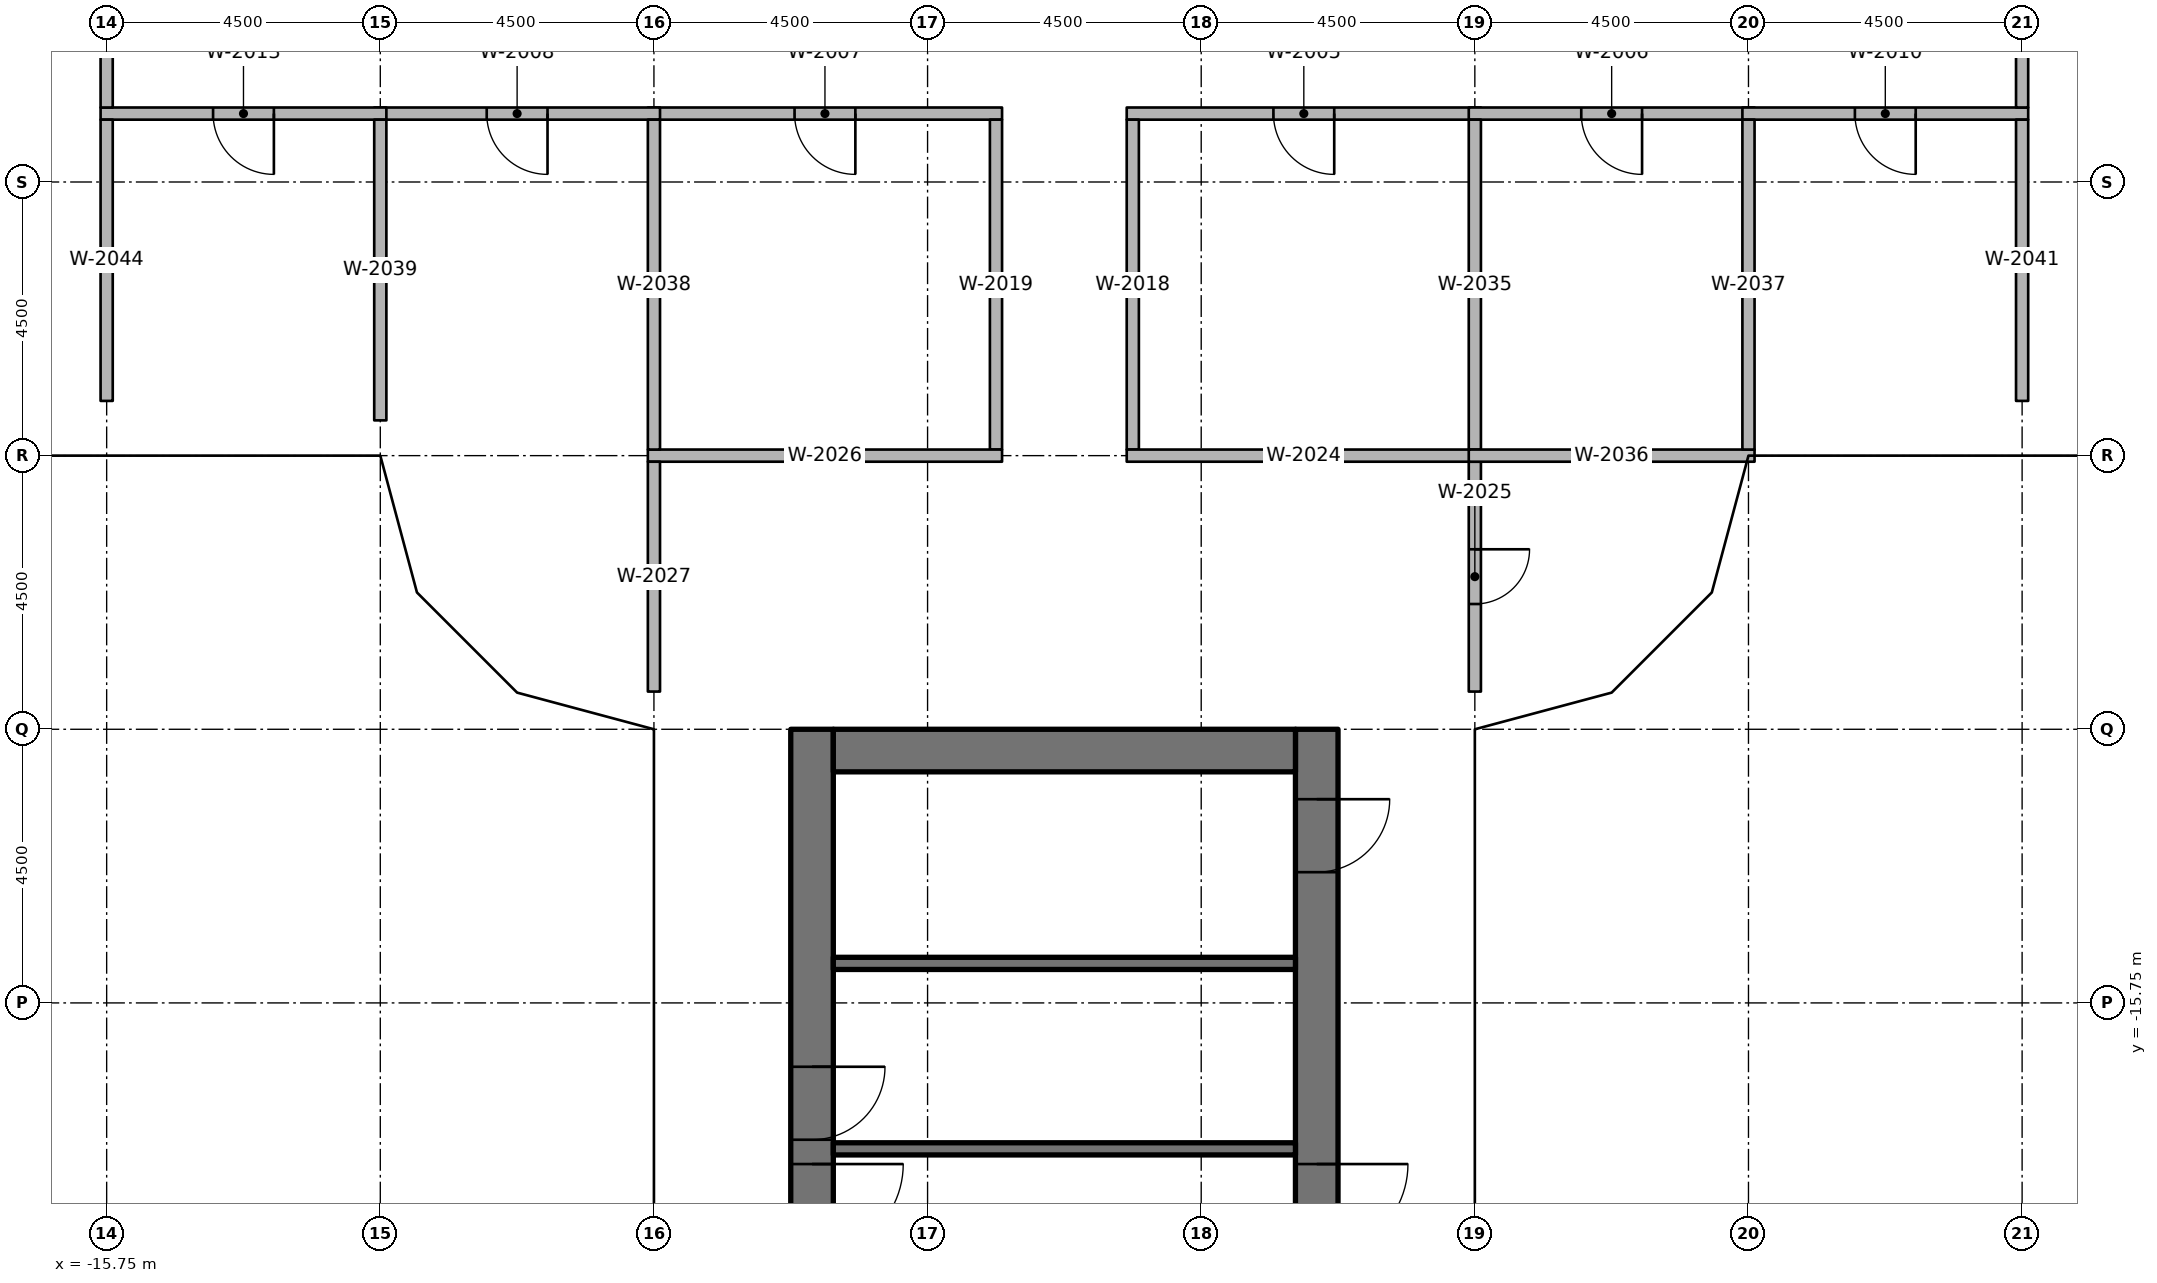
"""IFC4 building model, lengths in metres.
Left out: names, types, materials, properties, quantities, classifications, styles, units other than length and angle.
Written with IfcOpenShell. Run it as: python <this file> out.ifc"""

import sys

from ifc_helpers import new_model, si_unit, direction, frame, frame_2d, origin, origin_2d, place, context, subcontext, project, spatial, rectangle, extrude, element, fill, save


model = new_model("IFC4")
c1 = context("Model", 3, precision=1e-05, world=origin(), true_north=direction((0.0, 1.0)))
c2 = subcontext(c1, "Body", "Model", "MODEL_VIEW")
j1 = project(units=[si_unit("LENGTHUNIT", "METRE"), si_unit("PLANEANGLEUNIT", "RADIAN")], contexts=[c1])
p1 = place(None, origin())
s1 = spatial("IfcSite", under=j1, at=p1, CompositionType="ELEMENT")
p2 = place(p1, origin())
s2 = spatial("IfcBuilding", under=s1, at=p2, CompositionType="ELEMENT")
p3 = place(p2, frame((0.0, 0.0, 186.6)))
s3 = spatial("IfcBuildingStorey", under=s2, at=p3, CompositionType="ELEMENT", Elevation=186.6)
for number, where, z_axis, x_axis in (
    (1, (-15.75, -6.25, 0.0), (0.0, 0.0, 1.0), (1.0, 0.0, 0.0)),
    (2, (-10.75, -6.25, 0.0), (0.0, 0.0, 1.0), (1.0, 0.0, 0.0)),
    (3, (-6.25, -15.75, 0.0), (0.0, 0.0, 1.0), (1.0, 0.0, 0.0)),
    (4, (-6.25, -10.75, 0.0), (0.0, 0.0, 1.0), (1.0, 0.0, 0.0)),
    (5, (-6.25, -6.25, 0.0), (0.0, 0.0, 1.0), (1.0, 0.0, 0.0)),
    (6, (6.25, -15.75, 0.0), (0.0, 0.0, 1.0), (1.0, 0.0, 0.0)),
    (7, (6.25, -10.75, 0.0), (0.0, 0.0, 1.0), (1.0, 0.0, 0.0)),
    (8, (6.25, -6.25, 0.0), (0.0, 0.0, 1.0), (1.0, 0.0, 0.0)),
    (9, (10.75, -6.25, 0.0), (0.0, 0.0, 1.0), (1.0, 0.0, 0.0)),
    (10, (15.75, -6.25, 0.0), (0.0, 0.0, 1.0), (1.0, 0.0, 0.0)),
):
    element("IfcColumn", number, at=place(p3, frame(where, z_axis=z_axis, x_axis=x_axis)), inside=s3, PredefinedType="COLUMN", context=c2, shape_type="SweptSolid", body=[
        extrude(rectangle(XDim=0.8, YDim=0.8, at=origin_2d()), origin(), (0.0, 0.0, 1.0), 3.65),
    ])
p4 = place(p3, frame((-4.15, -11.25, 0.0), z_axis=(0.0, 0.0, 1.0), x_axis=(0.0, -1.0, 0.0)))
e11 = element("IfcWall", 11, at=p4, inside=s3, PredefinedType="SHEAR", context=c2, shape_type="SweptSolid", body=[
    extrude(rectangle(XDim=15.0, YDim=0.7, at=frame_2d((7.5, 0.0))), origin(), (0.0, 0.0, 1.0), 3.8),
])
p5 = place(p4, frame((7.15, 0.0, 0.0)))
e12 = element("IfcOpeningElement", 12, at=p5, cuts=e11, PredefinedType="OPENING", context=c2, shape_type="SweptSolid", body=[
    extrude(rectangle(XDim=1.5, YDim=2.3, at=frame_2d((0.75, 1.15))), frame((0.0, 0.36, 0.0), z_axis=(0.0, -1.0, 0.0), x_axis=(1.0, 0.0, 0.0)), (0.0, 0.0, 1.0), 0.72),
])
p6 = place(p4, frame((5.55, 0.0, 0.0)))
e13 = element("IfcOpeningElement", 13, at=p6, cuts=e11, PredefinedType="OPENING", context=c2, shape_type="SweptSolid", body=[
    extrude(rectangle(XDim=1.2, YDim=2.1, at=frame_2d((0.6, 1.05))), frame((0.0, 0.36, 0.0), z_axis=(0.0, -1.0, 0.0), x_axis=(1.0, 0.0, 0.0)), (0.0, 0.0, 1.0), 0.72),
])
p7 = place(p3, frame((4.15, -11.25, 0.0), z_axis=(0.0, 0.0, 1.0), x_axis=(0.0, -1.0, 0.0)))
e14 = element("IfcWall", 14, at=p7, inside=s3, PredefinedType="SHEAR", context=c2, shape_type="SweptSolid", body=[
    extrude(rectangle(XDim=15.0, YDim=0.7, at=frame_2d((7.5, 0.0))), origin(), (0.0, 0.0, 1.0), 3.8),
])
p8 = place(p7, frame((7.15, 0.0, 0.0)))
e15 = element("IfcOpeningElement", 15, at=p8, cuts=e14, PredefinedType="OPENING", context=c2, shape_type="SweptSolid", body=[
    extrude(rectangle(XDim=1.5, YDim=2.3, at=frame_2d((0.75, 1.15))), frame((0.0, 0.36, 0.0), z_axis=(0.0, -1.0, 0.0), x_axis=(1.0, 0.0, 0.0)), (0.0, 0.0, 1.0), 0.72),
])
p9 = place(p7, frame((13.9, 0.0, 0.0)))
e16 = element("IfcOpeningElement", 16, at=p9, cuts=e14, PredefinedType="OPENING", context=c2, shape_type="SweptSolid", body=[
    extrude(rectangle(XDim=0.9, YDim=2.1, at=frame_2d((0.45, 1.05))), frame((0.0, 0.36, 0.0), z_axis=(0.0, -1.0, 0.0), x_axis=(1.0, 0.0, 0.0)), (0.0, 0.0, 1.0), 0.72),
])
p10 = place(p7, frame((1.15, 0.0, 0.0)))
e17 = element("IfcOpeningElement", 17, at=p10, cuts=e14, PredefinedType="OPENING", context=c2, shape_type="SweptSolid", body=[
    extrude(rectangle(XDim=1.2, YDim=2.1, at=frame_2d((0.6, 1.05))), frame((0.0, 0.36, 0.0), z_axis=(0.0, -1.0, 0.0), x_axis=(1.0, 0.0, 0.0)), (0.0, 0.0, 1.0), 0.72),
])
p11 = place(p3, frame((-3.8, -11.6, 0.0), z_axis=(0.0, 0.0, 1.0), x_axis=(1.0, 0.0, 0.0)))
e18 = element("IfcWall", 18, at=p11, inside=s3, PredefinedType="SHEAR", context=c2, shape_type="SweptSolid", body=[
    extrude(rectangle(XDim=7.6, YDim=0.7, at=frame_2d((3.8, 0.0))), origin(), (0.0, 0.0, 1.0), 3.8),
])
for number, where, z_axis, x_axis in (
    (19, (3.8, -18.15, 0.0), (0.0, 0.0, 1.0), (-1.0, 0.0, 0.0)),
    (20, (3.8, -15.1, 0.0), (0.0, 0.0, 1.0), (-1.0, 0.0, 0.0)),
):
    element("IfcWall", number, at=place(p3, frame(where, z_axis=z_axis, x_axis=x_axis)), inside=s3, PredefinedType="SHEAR", context=c2, shape_type="SweptSolid", body=[
        extrude(rectangle(XDim=7.6, YDim=0.2, at=frame_2d((3.8, 0.0))), origin(), (0.0, 0.0, 1.0), 3.65),
    ])
p12 = place(p3, frame((6.85, -1.125, 0.0), z_axis=(0.0, 0.0, 1.0), x_axis=(-1.0, 0.0, 0.0)))
e21 = element("IfcWall", 21, at=p12, inside=s3, PredefinedType="PARTITIONING", context=c2, shape_type="SweptSolid", body=[
    extrude(rectangle(XDim=5.825, YDim=0.2, at=frame_2d((2.913, 0.0))), origin(), (0.0, 0.0, 1.0), 2.746),
])
p13 = place(p12, frame((2.413, 0.0, 0.0)))
e22 = element("IfcOpeningElement", 22, at=p13, cuts=e21, PredefinedType="OPENING", context=c2, shape_type="SweptSolid", body=[
    extrude(rectangle(XDim=1.0, YDim=2.1, at=frame_2d((0.5, 1.05))), frame((0.0, 0.11, 0.0), z_axis=(0.0, -1.0, 0.0), x_axis=(1.0, 0.0, 0.0)), (0.0, 0.0, 1.0), 0.22),
])
p14 = place(p3, frame((11.35, -1.125, 0.0), z_axis=(0.0, 0.0, 1.0), x_axis=(-1.0, 0.0, 0.0)))
e23 = element("IfcWall", 23, at=p14, inside=s3, PredefinedType="PARTITIONING", context=c2, shape_type="SweptSolid", body=[
    extrude(rectangle(XDim=4.7, YDim=0.2, at=frame_2d((2.35, 0.0))), origin(), (0.0, 0.0, 1.0), 2.746),
])
p15 = place(p14, frame((1.85, 0.0, 0.0)))
e24 = element("IfcOpeningElement", 24, at=p15, cuts=e23, PredefinedType="OPENING", context=c2, shape_type="SweptSolid", body=[
    extrude(rectangle(XDim=1.0, YDim=2.1, at=frame_2d((0.5, 1.05))), frame((0.0, 0.11, 0.0), z_axis=(0.0, -1.0, 0.0), x_axis=(1.0, 0.0, 0.0)), (0.0, 0.0, 1.0), 0.22),
])
p16 = place(p3, frame((-1.025, -1.125, 0.0), z_axis=(0.0, 0.0, 1.0), x_axis=(-1.0, 0.0, 0.0)))
e25 = element("IfcWall", 25, at=p16, inside=s3, PredefinedType="PARTITIONING", context=c2, shape_type="SweptSolid", body=[
    extrude(rectangle(XDim=5.825, YDim=0.2, at=frame_2d((2.913, 0.0))), origin(), (0.0, 0.0, 1.0), 2.746),
])
p17 = place(p16, frame((2.413, 0.0, 0.0)))
e26 = element("IfcOpeningElement", 26, at=p17, cuts=e25, PredefinedType="OPENING", context=c2, shape_type="SweptSolid", body=[
    extrude(rectangle(XDim=1.0, YDim=2.1, at=frame_2d((0.5, 1.05))), frame((0.0, 0.11, 0.0), z_axis=(0.0, -1.0, 0.0), x_axis=(1.0, 0.0, 0.0)), (0.0, 0.0, 1.0), 0.22),
])
p18 = place(p3, frame((-6.65, -1.125, 0.0), z_axis=(0.0, 0.0, 1.0), x_axis=(-1.0, 0.0, 0.0)))
e27 = element("IfcWall", 27, at=p18, inside=s3, PredefinedType="PARTITIONING", context=c2, shape_type="SweptSolid", body=[
    extrude(rectangle(XDim=4.7, YDim=0.2, at=frame_2d((2.35, 0.0))), origin(), (0.0, 0.0, 1.0), 2.746),
])
p19 = place(p18, frame((1.85, 0.0, 0.0)))
e28 = element("IfcOpeningElement", 28, at=p19, cuts=e27, PredefinedType="OPENING", context=c2, shape_type="SweptSolid", body=[
    extrude(rectangle(XDim=1.0, YDim=2.1, at=frame_2d((0.5, 1.05))), frame((0.0, 0.11, 0.0), z_axis=(0.0, -1.0, 0.0), x_axis=(1.0, 0.0, 0.0)), (0.0, 0.0, 1.0), 0.22),
])
p20 = place(p3, frame((15.85, -1.125, 0.0), z_axis=(0.0, 0.0, 1.0), x_axis=(-1.0, 0.0, 0.0)))
e29 = element("IfcWall", 29, at=p20, inside=s3, PredefinedType="PARTITIONING", context=c2, shape_type="SweptSolid", body=[
    extrude(rectangle(XDim=4.7, YDim=0.2, at=frame_2d((2.35, 0.0))), origin(), (0.0, 0.0, 1.0), 2.746),
])
p21 = place(p20, frame((1.85, 0.0, 0.0)))
e30 = element("IfcOpeningElement", 30, at=p21, cuts=e29, PredefinedType="OPENING", context=c2, shape_type="SweptSolid", body=[
    extrude(rectangle(XDim=1.0, YDim=2.1, at=frame_2d((0.5, 1.05))), frame((0.0, 0.11, 0.0), z_axis=(0.0, -1.0, 0.0), x_axis=(1.0, 0.0, 0.0)), (0.0, 0.0, 1.0), 0.22),
])
p22 = place(p3, frame((15.75, -1.025, 0.0), z_axis=(0.0, 0.0, 1.0), x_axis=(0.0, 1.0, 0.0)))
e31 = element("IfcWall", 31, at=p22, inside=s3, PredefinedType="PARTITIONING", context=c2, shape_type="SweptSolid", body=[
    extrude(rectangle(XDim=2.05, YDim=0.2, at=frame_2d((1.025, 0.0))), origin(), (0.0, 0.0, 1.0), 2.746),
])
p23 = place(p3, frame((-11.15, -1.125, 0.0), z_axis=(0.0, 0.0, 1.0), x_axis=(-1.0, 0.0, 0.0)))
e32 = element("IfcWall", 32, at=p23, inside=s3, PredefinedType="PARTITIONING", context=c2, shape_type="SweptSolid", body=[
    extrude(rectangle(XDim=4.7, YDim=0.2, at=frame_2d((2.35, 0.0))), origin(), (0.0, 0.0, 1.0), 2.746),
])
p24 = place(p23, frame((1.85, 0.0, 0.0)))
e33 = element("IfcOpeningElement", 33, at=p24, cuts=e32, PredefinedType="OPENING", context=c2, shape_type="SweptSolid", body=[
    extrude(rectangle(XDim=1.0, YDim=2.1, at=frame_2d((0.5, 1.05))), frame((0.0, 0.11, 0.0), z_axis=(0.0, -1.0, 0.0), x_axis=(1.0, 0.0, 0.0)), (0.0, 0.0, 1.0), 0.22),
])
p25 = place(p3, frame((-15.75, -1.025, 0.0), z_axis=(0.0, 0.0, 1.0), x_axis=(0.0, 1.0, 0.0)))
e34 = element("IfcWall", 34, at=p25, inside=s3, PredefinedType="PARTITIONING", context=c2, shape_type="SweptSolid", body=[
    extrude(rectangle(XDim=2.05, YDim=0.2, at=frame_2d((1.025, 0.0))), origin(), (0.0, 0.0, 1.0), 2.746),
])
for number, where, z_axis, x_axis in (
    (35, (1.125, -6.65, 0.0), (0.0, 0.0, 1.0), (0.0, 1.0, 0.0)),
    (36, (-1.125, -6.65, 0.0), (0.0, 0.0, 1.0), (0.0, 1.0, 0.0)),
):
    element("IfcWall", number, at=place(p3, frame(where, z_axis=z_axis, x_axis=x_axis)), inside=s3, PredefinedType="PARTITIONING", context=c2, shape_type="SweptSolid", body=[
        extrude(rectangle(XDim=5.425, YDim=0.2, at=frame_2d((2.712, 0.0))), origin(), (0.0, 0.0, 1.0), 2.746),
    ])
p26 = place(p3, frame((1.025, -6.75, 0.0), z_axis=(0.0, 0.0, 1.0), x_axis=(1.0, 0.0, 0.0)))
e37 = element("IfcWall", 37, at=p26, inside=s3, PredefinedType="PARTITIONING", context=c2, shape_type="SweptSolid", body=[
    extrude(rectangle(XDim=5.825, YDim=0.2, at=frame_2d((2.913, 0.0))), origin(), (0.0, 0.0, 1.0), 2.746),
])
p27 = place(p3, frame((6.75, -6.85, 0.0), z_axis=(0.0, 0.0, 1.0), x_axis=(0.0, -1.0, 0.0)))
e38 = element("IfcWall", 38, at=p27, inside=s3, PredefinedType="PARTITIONING", context=c2, shape_type="SweptSolid", body=[
    extrude(rectangle(XDim=3.78, YDim=0.2, at=frame_2d((1.89, 0.0))), origin(), (0.0, 0.0, 1.0), 2.746),
])
p28 = place(p27, frame((1.44, 0.0, 0.0)))
e39 = element("IfcOpeningElement", 39, at=p28, cuts=e38, PredefinedType="OPENING", context=c2, shape_type="SweptSolid", body=[
    extrude(rectangle(XDim=0.9, YDim=2.1, at=frame_2d((0.45, 1.05))), frame((0.0, 0.11, 0.0), z_axis=(0.0, -1.0, 0.0), x_axis=(1.0, 0.0, 0.0)), (0.0, 0.0, 1.0), 0.22),
])
p29 = place(p3, frame((-6.85, -6.75, 0.0), z_axis=(0.0, 0.0, 1.0), x_axis=(1.0, 0.0, 0.0)))
e40 = element("IfcWall", 40, at=p29, inside=s3, PredefinedType="PARTITIONING", context=c2, shape_type="SweptSolid", body=[
    extrude(rectangle(XDim=5.825, YDim=0.2, at=frame_2d((2.913, 0.0))), origin(), (0.0, 0.0, 1.0), 2.746),
])
p30 = place(p3, frame((-6.75, -10.63, 0.0), z_axis=(0.0, 0.0, 1.0), x_axis=(0.0, 1.0, 0.0)))
e41 = element("IfcWall", 41, at=p30, inside=s3, PredefinedType="PARTITIONING", context=c2, shape_type="SweptSolid", body=[
    extrude(rectangle(XDim=3.78, YDim=0.2, at=frame_2d((1.89, 0.0))), origin(), (0.0, 0.0, 1.0), 2.746),
])
p31 = place(p3, frame((6.75, -6.65, 0.0), z_axis=(0.0, 0.0, 1.0), x_axis=(0.0, 1.0, 0.0)))
e42 = element("IfcWall", 42, at=p31, inside=s3, PredefinedType="PARTITIONING", context=c2, shape_type="SweptSolid", body=[
    extrude(rectangle(XDim=5.425, YDim=0.2, at=frame_2d((2.712, 0.0))), origin(), (0.0, 0.0, 1.0), 2.746),
])
p32 = place(p3, frame((6.65, -6.75, 0.0), z_axis=(0.0, 0.0, 1.0), x_axis=(1.0, 0.0, 0.0)))
e43 = element("IfcWall", 43, at=p32, inside=s3, PredefinedType="PARTITIONING", context=c2, shape_type="SweptSolid", body=[
    extrude(rectangle(XDim=4.7, YDim=0.2, at=frame_2d((2.35, 0.0))), origin(), (0.0, 0.0, 1.0), 2.746),
])
for number, where, z_axis, x_axis in (
    (44, (11.25, -6.65, 0.0), (0.0, 0.0, 1.0), (0.0, 1.0, 0.0)),
    (45, (-6.75, -6.65, 0.0), (0.0, 0.0, 1.0), (0.0, 1.0, 0.0)),
):
    element("IfcWall", number, at=place(p3, frame(where, z_axis=z_axis, x_axis=x_axis)), inside=s3, PredefinedType="PARTITIONING", context=c2, shape_type="SweptSolid", body=[
        extrude(rectangle(XDim=5.425, YDim=0.2, at=frame_2d((2.712, 0.0))), origin(), (0.0, 0.0, 1.0), 2.746),
    ])
p33 = place(p3, frame((-11.25, -6.17, 0.0), z_axis=(0.0, 0.0, 1.0), x_axis=(0.0, 1.0, 0.0)))
e46 = element("IfcWall", 46, at=p33, inside=s3, PredefinedType="PARTITIONING", context=c2, shape_type="SweptSolid", body=[
    extrude(rectangle(XDim=4.945, YDim=0.2, at=frame_2d((2.472, 0.0))), origin(), (0.0, 0.0, 1.0), 2.746),
])
for number, where, z_axis, x_axis in (
    (47, (15.75, -5.85, 0.0), (0.0, 0.0, 1.0), (0.0, 1.0, 0.0)),
    (48, (-15.75, -5.85, 0.0), (0.0, 0.0, 1.0), (0.0, 1.0, 0.0)),
):
    element("IfcWall", number, at=place(p3, frame(where, z_axis=z_axis, x_axis=x_axis)), inside=s3, PredefinedType="PARTITIONING", context=c2, shape_type="SweptSolid", body=[
        extrude(rectangle(XDim=4.625, YDim=0.2, at=frame_2d((2.312, 0.0))), origin(), (0.0, 0.0, 1.0), 2.746),
    ])
p34 = place(p8, origin())
e49 = element("IfcDoor", 49, at=p34, inside=s3, OperationType="DOUBLE_DOOR_SINGLE_SWING", PredefinedType="DOOR", context=c2, shape_type="SweptSolid", body=[
    extrude(rectangle(XDim=1.5, YDim=2.3, at=frame_2d((0.75, 1.15))), frame((0.0, 0.025, 0.0), z_axis=(0.0, -1.0, 0.0), x_axis=(1.0, 0.0, 0.0)), (0.0, 0.0, 1.0), 0.05),
])
fill(e15, e49)
p35 = place(p5, origin())
e50 = element("IfcDoor", 50, at=p35, inside=s3, OperationType="DOUBLE_DOOR_SINGLE_SWING", PredefinedType="DOOR", context=c2, shape_type="SweptSolid", body=[
    extrude(rectangle(XDim=1.5, YDim=2.3, at=frame_2d((0.75, 1.15))), frame((0.0, 0.025, 0.0), z_axis=(0.0, -1.0, 0.0), x_axis=(1.0, 0.0, 0.0)), (0.0, 0.0, 1.0), 0.05),
])
fill(e12, e50)
p36 = place(p6, origin())
e51 = element("IfcDoor", 51, at=p36, inside=s3, OperationType="SINGLE_SWING_LEFT", PredefinedType="DOOR", context=c2, shape_type="SweptSolid", body=[
    extrude(rectangle(XDim=1.2, YDim=2.1, at=frame_2d((0.6, 1.05))), frame((0.0, 0.025, 0.0), z_axis=(0.0, -1.0, 0.0), x_axis=(1.0, 0.0, 0.0)), (0.0, 0.0, 1.0), 0.05),
])
fill(e13, e51)
p37 = place(p10, origin())
e52 = element("IfcDoor", 52, at=p37, inside=s3, OperationType="SINGLE_SWING_RIGHT", PredefinedType="DOOR", context=c2, shape_type="SweptSolid", body=[
    extrude(rectangle(XDim=1.2, YDim=2.1, at=frame_2d((0.6, 1.05))), frame((0.0, 0.025, 0.0), z_axis=(0.0, -1.0, 0.0), x_axis=(1.0, 0.0, 0.0)), (0.0, 0.0, 1.0), 0.05),
])
fill(e17, e52)
p38 = place(p21, origin())
e53 = element("IfcDoor", 53, at=p38, inside=s3, OperationType="SINGLE_SWING_RIGHT", PredefinedType="DOOR", context=c2, shape_type="SweptSolid", body=[
    extrude(rectangle(XDim=1.0, YDim=2.1, at=frame_2d((0.5, 1.05))), frame((0.0, 0.025, 0.0), z_axis=(0.0, -1.0, 0.0), x_axis=(1.0, 0.0, 0.0)), (0.0, 0.0, 1.0), 0.05),
])
fill(e30, e53)
p39 = place(p13, origin())
e54 = element("IfcDoor", 54, at=p39, inside=s3, OperationType="SINGLE_SWING_RIGHT", PredefinedType="DOOR", context=c2, shape_type="SweptSolid", body=[
    extrude(rectangle(XDim=1.0, YDim=2.1, at=frame_2d((0.5, 1.05))), frame((0.0, 0.025, 0.0), z_axis=(0.0, -1.0, 0.0), x_axis=(1.0, 0.0, 0.0)), (0.0, 0.0, 1.0), 0.05),
])
fill(e22, e54)
p40 = place(p15, origin())
e55 = element("IfcDoor", 55, at=p40, inside=s3, OperationType="SINGLE_SWING_RIGHT", PredefinedType="DOOR", context=c2, shape_type="SweptSolid", body=[
    extrude(rectangle(XDim=1.0, YDim=2.1, at=frame_2d((0.5, 1.05))), frame((0.0, 0.025, 0.0), z_axis=(0.0, -1.0, 0.0), x_axis=(1.0, 0.0, 0.0)), (0.0, 0.0, 1.0), 0.05),
])
fill(e24, e55)
p41 = place(p28, origin())
e56 = element("IfcDoor", 56, at=p41, inside=s3, OperationType="SINGLE_SWING_LEFT", PredefinedType="DOOR", context=c2, shape_type="SweptSolid", body=[
    extrude(rectangle(XDim=0.9, YDim=2.1, at=frame_2d((0.45, 1.05))), frame((0.0, 0.025, 0.0), z_axis=(0.0, -1.0, 0.0), x_axis=(1.0, 0.0, 0.0)), (0.0, 0.0, 1.0), 0.05),
])
fill(e39, e56)
p42 = place(p17, origin())
e57 = element("IfcDoor", 57, at=p42, inside=s3, OperationType="SINGLE_SWING_RIGHT", PredefinedType="DOOR", context=c2, shape_type="SweptSolid", body=[
    extrude(rectangle(XDim=1.0, YDim=2.1, at=frame_2d((0.5, 1.05))), frame((0.0, 0.025, 0.0), z_axis=(0.0, -1.0, 0.0), x_axis=(1.0, 0.0, 0.0)), (0.0, 0.0, 1.0), 0.05),
])
fill(e26, e57)
p43 = place(p19, origin())
e58 = element("IfcDoor", 58, at=p43, inside=s3, OperationType="SINGLE_SWING_RIGHT", PredefinedType="DOOR", context=c2, shape_type="SweptSolid", body=[
    extrude(rectangle(XDim=1.0, YDim=2.1, at=frame_2d((0.5, 1.05))), frame((0.0, 0.025, 0.0), z_axis=(0.0, -1.0, 0.0), x_axis=(1.0, 0.0, 0.0)), (0.0, 0.0, 1.0), 0.05),
])
fill(e28, e58)
p44 = place(p24, origin())
e59 = element("IfcDoor", 59, at=p44, inside=s3, OperationType="SINGLE_SWING_RIGHT", PredefinedType="DOOR", context=c2, shape_type="SweptSolid", body=[
    extrude(rectangle(XDim=1.0, YDim=2.1, at=frame_2d((0.5, 1.05))), frame((0.0, 0.025, 0.0), z_axis=(0.0, -1.0, 0.0), x_axis=(1.0, 0.0, 0.0)), (0.0, 0.0, 1.0), 0.05),
])
fill(e33, e59)
save(model, sys.argv[1])
